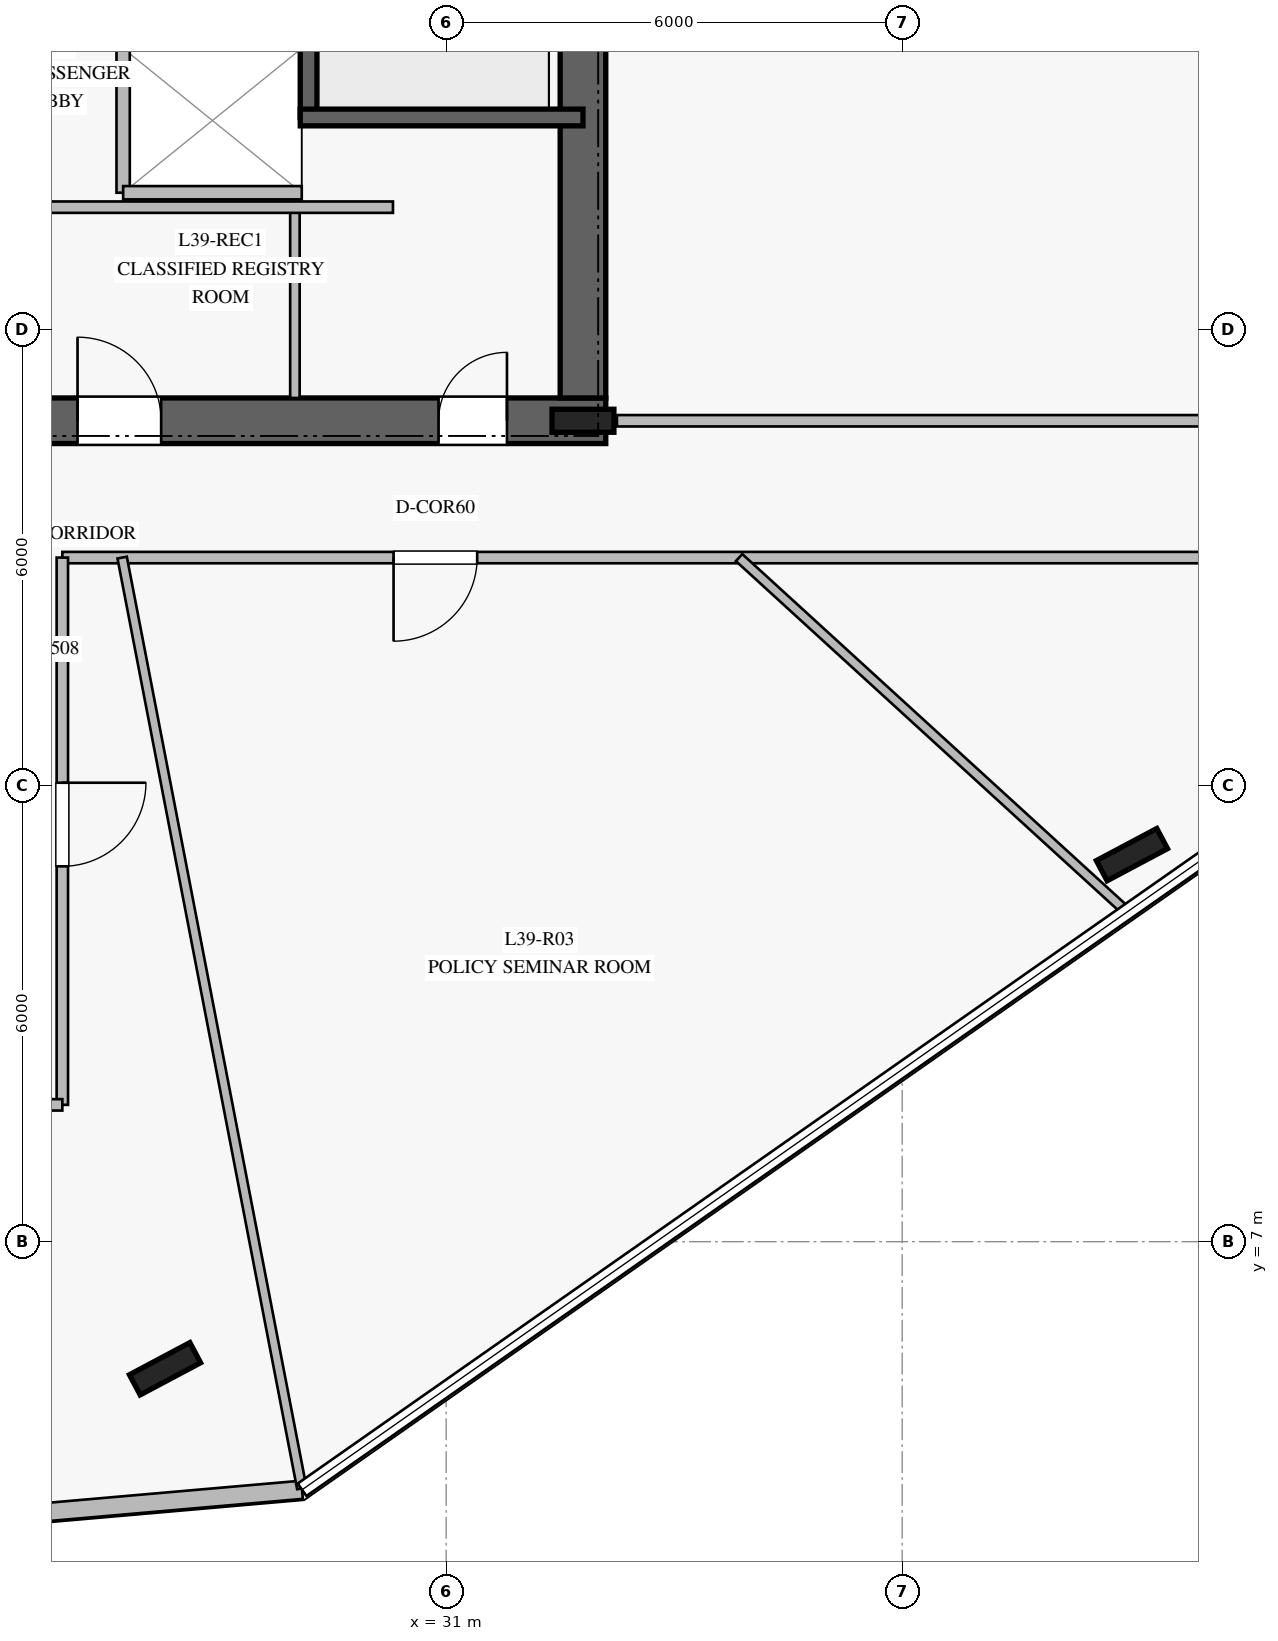
"""IFC4 building model, lengths in metres.
Left out: names, types, materials, properties, quantities, classifications, styles, units other than length and angle.
Written with IfcOpenShell. Run it as: python <this file> out.ifc"""

import sys

from ifc_helpers import new_model, si_unit, direction, frame, frame_2d, origin, origin_2d, place, context, subcontext, project, spatial, rectangle, i_section, extrude, element, fill, save


model = new_model("IFC4")
c1 = context("Model", 3, precision=1e-05, world=origin(), true_north=direction((0.0, 1.0)))
c2 = subcontext(c1, "Body", "Model", "MODEL_VIEW")
j1 = project(units=[si_unit("LENGTHUNIT", "METRE"), si_unit("PLANEANGLEUNIT", "RADIAN")], contexts=[c1])
p1 = place(None, origin())
s1 = spatial("IfcSite", under=j1, at=p1, CompositionType="ELEMENT")
p2 = place(p1, origin())
s2 = spatial("IfcBuilding", under=s1, at=p2, CompositionType="ELEMENT")
p3 = place(p2, frame((0.0, 0.0, 162.4)))
s3 = spatial("IfcBuildingStorey", under=s2, at=p3, CompositionType="ELEMENT", Elevation=162.4)
p4 = place(p3, frame((16.9, 17.8, 0.0), z_axis=(0.0, 0.0, 1.0), x_axis=(1.0, 0.0, 0.0)))
e1 = element("IfcWall", 1, at=p4, inside=s3, PredefinedType="SHEAR", context=c2, shape_type="SweptSolid", body=[
    extrude(rectangle(XDim=16.2, YDim=0.6, at=frame_2d((8.1, 0.0))), origin(), (0.0, 0.0, 1.0), 3.76),
])
p5 = place(p4, frame((5.05, 0.0, 0.0)))
e2 = element("IfcOpeningElement", 2, at=p5, cuts=e1, PredefinedType="OPENING", context=c2, shape_type="SweptSolid", body=[
    extrude(rectangle(XDim=1.2, YDim=2.25, at=frame_2d((0.6, 1.125))), frame((0.0, 0.31, 0.0), z_axis=(0.0, -1.0, 0.0), x_axis=(1.0, 0.0, 0.0)), (0.0, 0.0, 1.0), 0.62),
])
p6 = place(p4, frame((14.0, 0.0, 0.0)))
e3 = element("IfcOpeningElement", 3, at=p6, cuts=e1, PredefinedType="OPENING", context=c2, shape_type="SweptSolid", body=[
    extrude(rectangle(XDim=0.9, YDim=2.1, at=frame_2d((0.45, 1.05))), frame((0.0, 0.31, 0.0), z_axis=(0.0, -1.0, 0.0), x_axis=(1.0, 0.0, 0.0)), (0.0, 0.0, 1.0), 0.62),
])
p7 = place(p4, frame((9.25, 0.0, 0.0)))
e4 = element("IfcOpeningElement", 4, at=p7, cuts=e1, PredefinedType="OPENING", context=c2, shape_type="SweptSolid", body=[
    extrude(rectangle(XDim=1.1, YDim=2.2, at=frame_2d((0.55, 1.1))), frame((0.0, 0.31, 0.0), z_axis=(0.0, -1.0, 0.0), x_axis=(1.0, 0.0, 0.0)), (0.0, 0.0, 1.0), 0.62),
])
p8 = place(p3, frame((32.8, 18.1, 0.0), z_axis=(0.0, 0.0, 1.0), x_axis=(0.0, 1.0, 0.0)))
e5 = element("IfcWall", 5, at=p8, inside=s3, PredefinedType="SHEAR", context=c2, shape_type="SweptSolid", body=[
    extrude(rectangle(XDim=13.8, YDim=0.6, at=frame_2d((6.9, 0.0))), origin(), (0.0, 0.0, 1.0), 3.76),
])
p9 = place(p3, frame((32.8, 17.8, 0.0), z_axis=(0.0, 0.0, 1.0), x_axis=(1.0, 0.0, 0.0)))
e6 = element("IfcColumn", 6, at=p9, inside=s3, PredefinedType="COLUMN", context=c2, shape_type="SweptSolid", body=[
    extrude(i_section(OverallWidth=0.303, OverallDepth=0.814, WebThickness=0.021, FlangeThickness=0.04, at=origin_2d()), origin(), (0.0, 0.0, 1.0), 4.0),
])
p10 = place(p3, frame((29.19, 21.79, 0.0), z_axis=(0.0, 0.0, 1.0), x_axis=(0.0, 1.0, 0.0)))
e7 = element("IfcWall", 7, at=p10, inside=s3, PredefinedType="SOLIDWALL", context=c2, shape_type="SweptSolid", body=[
    extrude(rectangle(XDim=7.22, YDim=0.22, at=frame_2d((3.61, 0.0))), origin(), (0.0, 0.0, 1.0), 3.76),
])
p11 = place(p10, frame((5.88, 0.0, 0.0)))
e8 = element("IfcOpeningElement", 8, at=p11, cuts=e7, PredefinedType="OPENING", context=c2, shape_type="SweptSolid", body=[
    extrude(rectangle(XDim=1.15, YDim=2.2, at=frame_2d((0.575, 1.1))), frame((0.0, 0.12, 0.0), z_axis=(0.0, -1.0, 0.0), x_axis=(1.0, 0.0, 0.0)), (0.0, 0.0, 1.0), 0.24),
])
p12 = place(p3, frame((29.08, 21.79, 0.0), z_axis=(0.0, 0.0, 1.0), x_axis=(1.0, 0.0, 0.0)))
e9 = element("IfcWall", 9, at=p12, inside=s3, PredefinedType="SOLIDWALL", context=c2, shape_type="SweptSolid", body=[
    extrude(rectangle(XDim=3.72, YDim=0.22, at=frame_2d((1.86, 0.0))), origin(), (0.0, 0.0, 1.0), 3.76),
])
for number, where, z_axis, x_axis in (
    (10, (27.301, 5.328, 0.0), (0.0, 0.0, 1.0), (0.883, 0.469, 0.0)),
    (11, (40.023, 12.092, 0.0), (0.0, 0.0, 1.0), (0.883, 0.469, 0.0)),
):
    element("IfcColumn", number, at=place(p3, frame(where, z_axis=z_axis, x_axis=x_axis)), inside=s3, PredefinedType="COLUMN", context=c2, shape_type="SweptSolid", body=[
        extrude(i_section(OverallWidth=0.3, OverallDepth=0.9, WebThickness=0.019, FlangeThickness=0.035, at=origin_2d()), origin(), (0.0, 0.0, 1.0), 4.0),
    ])
p13 = place(p3, frame((24.65, 3.347, 0.0), z_axis=(0.0, 0.0, 1.0), x_axis=(0.996204852099, 0.087039603938, 0.0)))
e12 = element("IfcWall", 12, at=p13, inside=s3, PredefinedType="STANDARD", context=c2, shape_type="SweptSolid", body=[
    extrude(rectangle(XDim=4.471, YDim=0.24, at=frame_2d((2.236, 0.0))), origin(), (0.0, 0.0, 1.0), 3.76),
])
p14 = place(p3, frame((29.01, 18.1, 0.0), z_axis=(0.0, 0.0, 1.0), x_axis=(0.0, 1.0, 0.0)))
e13 = element("IfcWall", 13, at=p14, inside=s3, PredefinedType="PARTITIONING", context=c2, shape_type="SweptSolid", body=[
    extrude(rectangle(XDim=2.45, YDim=0.125, at=frame_2d((1.225, 0.0))), origin(), (0.0, 0.0, 1.0), 3.76),
])
p15 = place(p3, frame((24.4, 20.61, 0.0), z_axis=(0.0, 0.0, 1.0), x_axis=(1.0, 0.0, 0.0)))
e14 = element("IfcWall", 14, at=p15, inside=s3, PredefinedType="PARTITIONING", context=c2, shape_type="SweptSolid", body=[
    extrude(rectangle(XDim=5.9, YDim=0.15, at=frame_2d((2.95, 0.0))), origin(), (0.0, 0.0, 1.0), 3.76),
])
p16 = place(p3, frame((26.75, 20.8, 0.0), z_axis=(0.0, 0.0, 1.0), x_axis=(0.0, 1.0, 0.0)))
e15 = element("IfcWall", 15, at=p16, inside=s3, PredefinedType="PARTITIONING", context=c2, shape_type="SweptSolid", body=[
    extrude(rectangle(XDim=1.9, YDim=0.175, at=frame_2d((0.95, 0.0))), origin(), (0.0, 0.0, 1.0), 3.76),
])
p17 = place(p3, frame((26.75, 20.8, 0.0), z_axis=(0.0, 0.0, 1.0), x_axis=(1.0, 0.0, 0.0)))
e16 = element("IfcWall", 16, at=p17, inside=s3, PredefinedType="PARTITIONING", context=c2, shape_type="SweptSolid", body=[
    extrude(rectangle(XDim=2.35, YDim=0.175, at=frame_2d((1.175, 0.0))), origin(), (0.0, 0.0, 1.0), 3.76),
])
p18 = place(p3, frame((33.247, 17.8, 0.0), z_axis=(0.0, 0.0, 1.0), x_axis=(1.0, 0.0, 0.0)))
e17 = element("IfcWall", 17, at=p18, inside=s3, PredefinedType="PARTITIONING", context=c2, shape_type="SweptSolid", body=[
    extrude(rectangle(XDim=7.953, YDim=0.15, at=frame_2d((3.977, 0.0))), origin(), (0.0, 0.0, 1.0), 3.05),
])
p19 = place(p3, frame((41.2, 16.0, 0.0), z_axis=(0.0, 0.0, 1.0), x_axis=(-1.0, 0.0, 0.0)))
e18 = element("IfcWall", 18, at=p19, inside=s3, PredefinedType="PARTITIONING", context=c2, shape_type="SweptSolid", body=[
    extrude(rectangle(XDim=15.25, YDim=0.15, at=frame_2d((7.625, 0.0))), origin(), (0.0, 0.0, 1.0), 3.21),
])
p20 = place(p19, frame((9.792, 0.0, 0.0)))
e19 = element("IfcOpeningElement", 19, at=p20, cuts=e18, PredefinedType="OPENING", context=c2, shape_type="SweptSolid", body=[
    extrude(rectangle(XDim=1.1, YDim=2.2, at=frame_2d((0.55, 1.1))), frame((0.0, 0.085, 0.0), z_axis=(0.0, -1.0, 0.0), x_axis=(1.0, 0.0, 0.0)), (0.0, 0.0, 1.0), 0.17),
])
p21 = place(p3, frame((25.95, 16.0, 0.0), z_axis=(0.0, 0.0, 1.0), x_axis=(0.0, -1.0, 0.0)))
e20 = element("IfcWall", 20, at=p21, inside=s3, PredefinedType="PARTITIONING", context=c2, shape_type="SweptSolid", body=[
    extrude(rectangle(XDim=7.2, YDim=0.15, at=frame_2d((3.6, 0.0))), origin(), (0.0, 0.0, 1.0), 3.36),
])
p22 = place(p21, frame((2.962, 0.0, 0.0)))
e21 = element("IfcOpeningElement", 21, at=p22, cuts=e20, PredefinedType="OPENING", context=c2, shape_type="SweptSolid", body=[
    extrude(rectangle(XDim=1.1, YDim=2.2, at=frame_2d((0.55, 1.1))), frame((0.0, 0.085, 0.0), z_axis=(0.0, -1.0, 0.0), x_axis=(1.0, 0.0, 0.0)), (0.0, 0.0, 1.0), 0.17),
])
p23 = place(p3, frame((25.95, 8.8, 0.0), z_axis=(0.0, 0.0, 1.0), x_axis=(-1.0, 0.0, 0.0)))
e22 = element("IfcWall", 22, at=p23, inside=s3, PredefinedType="PARTITIONING", context=c2, shape_type="SweptSolid", body=[
    extrude(rectangle(XDim=1.9, YDim=0.15, at=frame_2d((0.95, 0.0))), origin(), (0.0, 0.0, 1.0), 3.76),
])
p24 = place(p3, frame((26.737, 16.0, 0.0), z_axis=(0.0, 0.0, 1.0), x_axis=(0.189557453442, -0.981869630778, 0.0)))
e23 = element("IfcWall", 23, at=p24, inside=s3, PredefinedType="PARTITIONING", context=c2, shape_type="SweptSolid", body=[
    extrude(rectangle(XDim=12.471, YDim=0.125, at=frame_2d((6.236, 0.0))), origin(), (0.0, 0.0, 1.0), 3.16),
])
p25 = place(p3, frame((34.854, 16.0, 0.0), z_axis=(0.0, 0.0, 1.0), x_axis=(0.738368219991, -0.674397784477, 0.0)))
e24 = element("IfcWall", 24, at=p25, inside=s3, PredefinedType="PARTITIONING", context=c2, shape_type="SweptSolid", body=[
    extrude(rectangle(XDim=6.896, YDim=0.125, at=frame_2d((3.448, 0.0))), origin(), (0.0, 0.0, 1.0), 3.02),
])
p26 = place(p6, origin())
e25 = element("IfcDoor", 25, at=p26, inside=s3, OperationType="SINGLE_SWING_RIGHT", PredefinedType="DOOR", context=c2, shape_type="SweptSolid", body=[
    extrude(rectangle(XDim=0.9, YDim=2.1, at=frame_2d((0.45, 1.05))), frame((0.0, 0.025, 0.0), z_axis=(0.0, -1.0, 0.0), x_axis=(1.0, 0.0, 0.0)), (0.0, 0.0, 1.0), 0.05),
])
fill(e3, e25)
p27 = place(p7, origin())
e26 = element("IfcDoor", 26, at=p27, inside=s3, OperationType="SINGLE_SWING_LEFT", PredefinedType="DOOR", context=c2, shape_type="SweptSolid", body=[
    extrude(rectangle(XDim=1.1, YDim=2.2, at=frame_2d((0.55, 1.1))), frame((0.0, 0.025, 0.0), z_axis=(0.0, -1.0, 0.0), x_axis=(1.0, 0.0, 0.0)), (0.0, 0.0, 1.0), 0.05),
])
fill(e4, e26)
p28 = place(p22, origin())
e27 = element("IfcDoor", 27, at=p28, inside=s3, OperationType="SINGLE_SWING_LEFT", PredefinedType="DOOR", context=c2, shape_type="SweptSolid", body=[
    extrude(rectangle(XDim=1.1, YDim=2.2, at=frame_2d((0.55, 1.1))), frame((0.0, 0.025, 0.0), z_axis=(0.0, -1.0, 0.0), x_axis=(1.0, 0.0, 0.0)), (0.0, 0.0, 1.0), 0.05),
])
fill(e21, e27)
p29 = place(p20, origin())
e28 = element("IfcDoor", 28, at=p29, inside=s3, OperationType="SINGLE_SWING_RIGHT", PredefinedType="DOOR", context=c2, shape_type="SweptSolid", body=[
    extrude(rectangle(XDim=1.1, YDim=2.2, at=frame_2d((0.55, 1.1))), frame((0.0, 0.025, 0.0), z_axis=(0.0, -1.0, 0.0), x_axis=(1.0, 0.0, 0.0)), (0.0, 0.0, 1.0), 0.05),
])
fill(e19, e28)
save(model, sys.argv[1])
